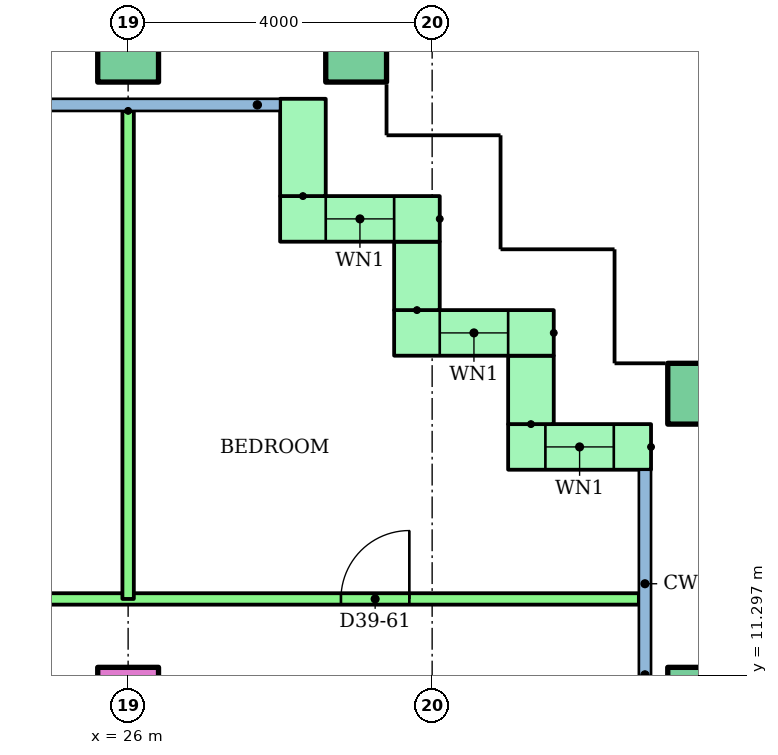
"""IFC4 building model, lengths in metres.
Left out: names, types, materials, properties, quantities, classifications, styles, units other than length and angle.
Written with IfcOpenShell. Run it as: python <this file> out.ifc"""

import sys

from ifc_helpers import new_model, si_unit, direction, frame, frame_2d, origin, origin_2d, place, context, subcontext, project, spatial, rectangle, hollow_rectangle, extrude, element, fill, save


model = new_model("IFC4")
c1 = context("Model", 3, precision=1e-05, world=origin(), true_north=direction((0.0, 1.0)))
c2 = subcontext(c1, "Body", "Model", "MODEL_VIEW")
j1 = project(units=[si_unit("LENGTHUNIT", "METRE"), si_unit("PLANEANGLEUNIT", "RADIAN")], contexts=[c1])
p1 = place(None, origin())
s1 = spatial("IfcSite", under=j1, at=p1, CompositionType="ELEMENT")
p2 = place(p1, origin())
s2 = spatial("IfcBuilding", under=s1, at=p2, CompositionType="ELEMENT")
p3 = place(p2, frame((0.0, 0.0, 148.6)))
s3 = spatial("IfcBuildingStorey", under=s2, at=p3, CompositionType="ELEMENT", Elevation=148.6)
p4 = place(p3, frame((26.0, 11.0, 0.0)))
e1 = element("IfcColumn", 1, at=p4, inside=s3, PredefinedType="COLUMN", context=c2, shape_type="SweptSolid", body=[
    extrude(rectangle(XDim=0.8, YDim=0.8, at=origin_2d()), origin(), (0.0, 0.0, 1.0), 3.2),
])
for number, where in (
    (2, (33.5, 11.0, 0.0)),
    (3, (33.5, 15.0, 0.0)),
    (4, (26.0, 19.5, 0.0)),
    (5, (29.0, 19.5, 0.0)),
):
    element("IfcColumn", number, at=place(p3, frame(where)), inside=s3, PredefinedType="COLUMN", context=c2, shape_type="SweptSolid", body=[
        extrude(hollow_rectangle(XDim=0.8, YDim=0.8, WallThickness=0.04, at=origin_2d()), origin(), (0.0, 0.0, 1.0), 3.2),
    ])
p5 = place(p3, frame((32.88, 14.3, 0.0), z_axis=(0.0, 0.0, 1.0), x_axis=(-1.0, 0.0, 0.0)))
e6 = element("IfcWall", 6, at=p5, inside=s3, PredefinedType="STANDARD", context=c2, shape_type="SweptSolid", body=[
    extrude(rectangle(XDim=1.88, YDim=0.6, at=frame_2d((0.94, 0.0))), origin(), (0.0, 0.0, 1.0), 2.8),
])
p6 = place(p5, frame((0.49, 0.0, 0.9)))
e7 = element("IfcOpeningElement", 7, at=p6, cuts=e6, PredefinedType="OPENING", context=c2, shape_type="SweptSolid", body=[
    extrude(rectangle(XDim=0.9, YDim=1.5, at=frame_2d((0.45, 0.75))), frame((0.0, 0.31, 0.0), z_axis=(0.0, -1.0, 0.0), x_axis=(1.0, 0.0, 0.0)), (0.0, 0.0, 1.0), 0.62),
])
p7 = place(p3, frame((31.3, 14.6, 0.0), z_axis=(0.0, 0.0, 1.0), x_axis=(0.0, 1.0, 0.0)))
e8 = element("IfcWall", 8, at=p7, inside=s3, PredefinedType="STANDARD", context=c2, shape_type="SweptSolid", body=[
    extrude(rectangle(XDim=0.9, YDim=0.6, at=frame_2d((0.45, 0.0))), origin(), (0.0, 0.0, 1.0), 2.8),
])
p8 = place(p3, frame((31.6, 15.8, 0.0), z_axis=(0.0, 0.0, 1.0), x_axis=(-1.0, 0.0, 0.0)))
e9 = element("IfcWall", 9, at=p8, inside=s3, PredefinedType="STANDARD", context=c2, shape_type="SweptSolid", body=[
    extrude(rectangle(XDim=2.1, YDim=0.6, at=frame_2d((1.05, 0.0))), origin(), (0.0, 0.0, 1.0), 2.8),
])
p9 = place(p8, frame((0.6, 0.0, 0.9)))
e10 = element("IfcOpeningElement", 10, at=p9, cuts=e9, PredefinedType="OPENING", context=c2, shape_type="SweptSolid", body=[
    extrude(rectangle(XDim=0.9, YDim=1.5, at=frame_2d((0.45, 0.75))), frame((0.0, 0.31, 0.0), z_axis=(0.0, -1.0, 0.0), x_axis=(1.0, 0.0, 0.0)), (0.0, 0.0, 1.0), 0.62),
])
p10 = place(p3, frame((29.8, 16.1, 0.0), z_axis=(0.0, 0.0, 1.0), x_axis=(0.0, 1.0, 0.0)))
e11 = element("IfcWall", 11, at=p10, inside=s3, PredefinedType="STANDARD", context=c2, shape_type="SweptSolid", body=[
    extrude(rectangle(XDim=0.9, YDim=0.6, at=frame_2d((0.45, 0.0))), origin(), (0.0, 0.0, 1.0), 2.8),
])
p11 = place(p3, frame((30.1, 17.3, 0.0), z_axis=(0.0, 0.0, 1.0), x_axis=(-1.0, 0.0, 0.0)))
e12 = element("IfcWall", 12, at=p11, inside=s3, PredefinedType="STANDARD", context=c2, shape_type="SweptSolid", body=[
    extrude(rectangle(XDim=2.1, YDim=0.6, at=frame_2d((1.05, 0.0))), origin(), (0.0, 0.0, 1.0), 2.8),
])
p12 = place(p11, frame((0.6, 0.0, 0.9)))
e13 = element("IfcOpeningElement", 13, at=p12, cuts=e12, PredefinedType="OPENING", context=c2, shape_type="SweptSolid", body=[
    extrude(rectangle(XDim=0.9, YDim=1.5, at=frame_2d((0.45, 0.75))), frame((0.0, 0.31, 0.0), z_axis=(0.0, -1.0, 0.0), x_axis=(1.0, 0.0, 0.0)), (0.0, 0.0, 1.0), 0.62),
])
p13 = place(p3, frame((28.3, 17.6, 0.0), z_axis=(0.0, 0.0, 1.0), x_axis=(0.0, 1.0, 0.0)))
e14 = element("IfcWall", 14, at=p13, inside=s3, PredefinedType="STANDARD", context=c2, shape_type="SweptSolid", body=[
    extrude(rectangle(XDim=1.28, YDim=0.6, at=frame_2d((0.64, 0.0))), origin(), (0.0, 0.0, 1.0), 2.8),
])
p14 = place(p3, frame((14.0, 12.3, 0.0)))
e15 = element("IfcWall", 15, at=p14, inside=s3, PredefinedType="PARTITIONING", context=c2, shape_type="SweptSolid", body=[
    extrude(rectangle(XDim=18.72, YDim=0.15, at=frame_2d((9.36, 0.0))), origin(), (0.0, 0.0, 1.0), 2.4),
])
p15 = place(p14, frame((1.5, 0.0, 0.0)))
e16 = element("IfcOpeningElement", 16, at=p15, cuts=e15, PredefinedType="OPENING", context=c2, shape_type="SweptSolid", body=[
    extrude(rectangle(XDim=1.0, YDim=2.1, at=frame_2d((0.5, 1.05))), frame((0.0, 0.085, 0.0), z_axis=(0.0, -1.0, 0.0), x_axis=(1.0, 0.0, 0.0)), (0.0, 0.0, 1.0), 0.17),
])
p16 = place(p14, frame((7.55, 0.0, 0.0)))
e17 = element("IfcOpeningElement", 17, at=p16, cuts=e15, PredefinedType="OPENING", context=c2, shape_type="SweptSolid", body=[
    extrude(rectangle(XDim=0.9, YDim=2.1, at=frame_2d((0.45, 1.05))), frame((0.0, 0.085, 0.0), z_axis=(0.0, -1.0, 0.0), x_axis=(1.0, 0.0, 0.0)), (0.0, 0.0, 1.0), 0.17),
])
p17 = place(p14, frame((14.8, 0.0, 0.0)))
e18 = element("IfcOpeningElement", 18, at=p17, cuts=e15, PredefinedType="OPENING", context=c2, shape_type="SweptSolid", body=[
    extrude(rectangle(XDim=0.9, YDim=2.1, at=frame_2d((0.45, 1.05))), frame((0.0, 0.085, 0.0), z_axis=(0.0, -1.0, 0.0), x_axis=(1.0, 0.0, 0.0)), (0.0, 0.0, 1.0), 0.17),
])
p18 = place(p3, frame((26.0, 18.721, 0.0), z_axis=(0.0, 0.0, 1.0), x_axis=(0.0, -1.0, 0.0)))
e19 = element("IfcWall", 19, at=p18, inside=s3, PredefinedType="PARTITIONING", context=c2, shape_type="SweptSolid", body=[
    extrude(rectangle(XDim=6.421, YDim=0.15, at=frame_2d((3.21, 0.0))), origin(), (0.0, 0.0, 1.0), 2.4),
])
p19 = place(p6, origin())
e20 = element("IfcWindow", 20, at=p19, inside=s3, PartitioningType="SINGLE_PANEL", PredefinedType="WINDOW", context=c2, shape_type="SweptSolid", body=[
    extrude(rectangle(XDim=0.9, YDim=1.5, at=frame_2d((0.45, 0.75))), frame((0.0, 0.03, 0.0), z_axis=(0.0, -1.0, 0.0), x_axis=(1.0, 0.0, 0.0)), (0.0, 0.0, 1.0), 0.06),
])
fill(e7, e20)
p20 = place(p9, origin())
e21 = element("IfcWindow", 21, at=p20, inside=s3, PartitioningType="SINGLE_PANEL", PredefinedType="WINDOW", context=c2, shape_type="SweptSolid", body=[
    extrude(rectangle(XDim=0.9, YDim=1.5, at=frame_2d((0.45, 0.75))), frame((0.0, 0.03, 0.0), z_axis=(0.0, -1.0, 0.0), x_axis=(1.0, 0.0, 0.0)), (0.0, 0.0, 1.0), 0.06),
])
fill(e10, e21)
p21 = place(p12, origin())
e22 = element("IfcWindow", 22, at=p21, inside=s3, PartitioningType="SINGLE_PANEL", PredefinedType="WINDOW", context=c2, shape_type="SweptSolid", body=[
    extrude(rectangle(XDim=0.9, YDim=1.5, at=frame_2d((0.45, 0.75))), frame((0.0, 0.03, 0.0), z_axis=(0.0, -1.0, 0.0), x_axis=(1.0, 0.0, 0.0)), (0.0, 0.0, 1.0), 0.06),
])
fill(e13, e22)
p22 = place(p17, origin())
e23 = element("IfcDoor", 23, at=p22, inside=s3, OperationType="SINGLE_SWING_RIGHT", PredefinedType="DOOR", context=c2, shape_type="SweptSolid", body=[
    extrude(rectangle(XDim=0.9, YDim=2.1, at=frame_2d((0.45, 1.05))), frame((0.0, 0.025, 0.0), z_axis=(0.0, -1.0, 0.0), x_axis=(1.0, 0.0, 0.0)), (0.0, 0.0, 1.0), 0.05),
])
fill(e18, e23)
save(model, sys.argv[1])
